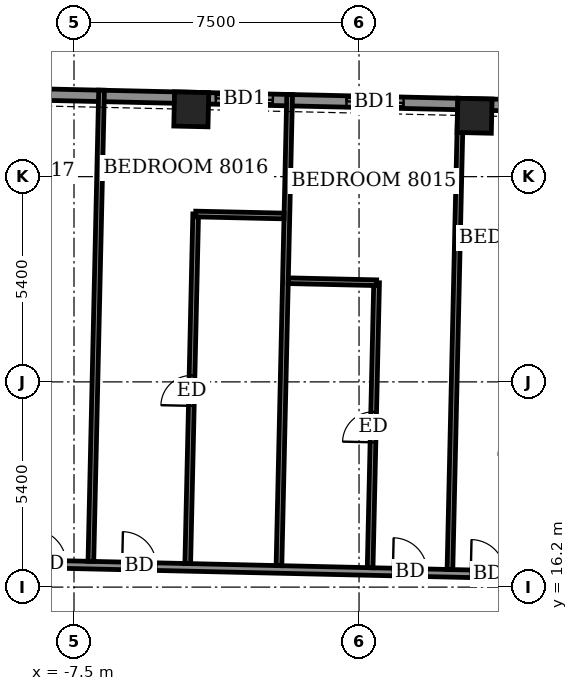
"""IFC4 building model, lengths in metres.
Left out: names, types, materials, properties, quantities, classifications, styles, units other than length and angle.
Written with IfcOpenShell. Run it as: python <this file> out.ifc"""

import sys

from ifc_helpers import new_model, si_unit, direction, frame, frame_2d, origin, origin_2d, place, context, subcontext, project, spatial, rectangle, extrude, element, fill, save


model = new_model("IFC4")
c1 = context("Model", 3, precision=1e-05, world=origin(), true_north=direction((0.0, 1.0)))
c2 = subcontext(c1, "Body", "Model", "MODEL_VIEW")
j1 = project(units=[si_unit("LENGTHUNIT", "METRE"), si_unit("PLANEANGLEUNIT", "RADIAN")], contexts=[c1])
p1 = place(None, origin())
s1 = spatial("IfcSite", under=j1, at=p1, CompositionType="ELEMENT")
p2 = place(p1, origin())
s2 = spatial("IfcBuilding", under=s1, at=p2, CompositionType="ELEMENT")
p3 = place(p2, frame((0.0, 0.0, 313.3)))
s3 = spatial("IfcBuildingStorey", under=s2, at=p3, CompositionType="ELEMENT", Elevation=313.3)
for number, where, z_axis, x_axis in (
    (1, (3.041, 28.602, -0.55), (0.0, 0.0, 1.0), (-1.0, 0.023, 0.0)),
    (2, (-4.414, 28.771, -0.55), (0.0, 0.0, 1.0), (-1.0, 0.023, 0.0)),
):
    element("IfcColumn", number, at=place(p3, frame(where, z_axis=z_axis, x_axis=x_axis)), inside=s3, PredefinedType="COLUMN", context=c2, shape_type="SweptSolid", body=[
        extrude(rectangle(XDim=0.9, YDim=0.9, at=origin_2d()), origin(), (0.0, 0.0, 1.0), 3.6),
    ])
p4 = place(p3, frame((25.264, 28.397, 0.0), z_axis=(0.0, 0.0, 1.0), x_axis=(-0.999742391375, 0.022696935658, 0.0)))
e3 = element("IfcWall", 3, at=p4, inside=s3, PredefinedType="SOLIDWALL", context=c2, shape_type="SweptSolid", body=[
    extrude(rectangle(XDim=51.9, YDim=0.3, at=frame_2d((25.95, 0.0))), origin(), (0.0, 0.0, 1.0), 2.5),
])
p5 = place(p4, frame((1.898, 0.0, 0.0)))
e4 = element("IfcOpeningElement", 4, at=p5, cuts=e3, PredefinedType="OPENING", context=c2, shape_type="SweptSolid", body=[
    extrude(rectangle(XDim=1.5, YDim=2.4, at=frame_2d((0.75, 1.2))), frame((0.0, 0.16, 0.0), z_axis=(0.0, -1.0, 0.0), x_axis=(1.0, 0.0, 0.0)), (0.0, 0.0, 1.0), 0.32),
])
p6 = place(p4, frame((5.229, 0.0, 0.0)))
e5 = element("IfcOpeningElement", 5, at=p6, cuts=e3, PredefinedType="OPENING", context=c2, shape_type="SweptSolid", body=[
    extrude(rectangle(XDim=1.5, YDim=2.4, at=frame_2d((0.75, 1.2))), frame((0.0, 0.16, 0.0), z_axis=(0.0, -1.0, 0.0), x_axis=(1.0, 0.0, 0.0)), (0.0, 0.0, 1.0), 0.32),
])
p7 = place(p4, frame((10.7, 0.0, 0.0)))
e6 = element("IfcOpeningElement", 6, at=p7, cuts=e3, PredefinedType="OPENING", context=c2, shape_type="SweptSolid", body=[
    extrude(rectangle(XDim=1.5, YDim=2.4, at=frame_2d((0.75, 1.2))), frame((0.0, 0.16, 0.0), z_axis=(0.0, -1.0, 0.0), x_axis=(1.0, 0.0, 0.0)), (0.0, 0.0, 1.0), 0.32),
])
p8 = place(p4, frame((15.832, 0.0, 0.0)))
e7 = element("IfcOpeningElement", 7, at=p8, cuts=e3, PredefinedType="OPENING", context=c2, shape_type="SweptSolid", body=[
    extrude(rectangle(XDim=1.5, YDim=2.4, at=frame_2d((0.75, 1.2))), frame((0.0, 0.16, 0.0), z_axis=(0.0, -1.0, 0.0), x_axis=(1.0, 0.0, 0.0)), (0.0, 0.0, 1.0), 0.32),
])
p9 = place(p4, frame((19.361, 0.0, 0.0)))
e8 = element("IfcOpeningElement", 8, at=p9, cuts=e3, PredefinedType="OPENING", context=c2, shape_type="SweptSolid", body=[
    extrude(rectangle(XDim=1.5, YDim=2.4, at=frame_2d((0.75, 1.2))), frame((0.0, 0.16, 0.0), z_axis=(0.0, -1.0, 0.0), x_axis=(1.0, 0.0, 0.0)), (0.0, 0.0, 1.0), 0.32),
])
p10 = place(p4, frame((24.1, 0.0, 0.0)))
e9 = element("IfcOpeningElement", 9, at=p10, cuts=e3, PredefinedType="OPENING", context=c2, shape_type="SweptSolid", body=[
    extrude(rectangle(XDim=1.5, YDim=2.4, at=frame_2d((0.75, 1.2))), frame((0.0, 0.16, 0.0), z_axis=(0.0, -1.0, 0.0), x_axis=(1.0, 0.0, 0.0)), (0.0, 0.0, 1.0), 0.32),
])
p11 = place(p4, frame((27.539, 0.0, 0.0)))
e10 = element("IfcOpeningElement", 10, at=p11, cuts=e3, PredefinedType="OPENING", context=c2, shape_type="SweptSolid", body=[
    extrude(rectangle(XDim=1.5, YDim=2.4, at=frame_2d((0.75, 1.2))), frame((0.0, 0.16, 0.0), z_axis=(0.0, -1.0, 0.0), x_axis=(1.0, 0.0, 0.0)), (0.0, 0.0, 1.0), 0.32),
])
p12 = place(p4, frame((33.6, 0.0, 0.0)))
e11 = element("IfcOpeningElement", 11, at=p12, cuts=e3, PredefinedType="OPENING", context=c2, shape_type="SweptSolid", body=[
    extrude(rectangle(XDim=1.5, YDim=2.4, at=frame_2d((0.75, 1.2))), frame((0.0, 0.16, 0.0), z_axis=(0.0, -1.0, 0.0), x_axis=(1.0, 0.0, 0.0)), (0.0, 0.0, 1.0), 0.32),
])
p13 = place(p4, frame((38.643, 0.0, 0.0)))
e12 = element("IfcOpeningElement", 12, at=p13, cuts=e3, PredefinedType="OPENING", context=c2, shape_type="SweptSolid", body=[
    extrude(rectangle(XDim=1.5, YDim=2.4, at=frame_2d((0.75, 1.2))), frame((0.0, 0.16, 0.0), z_axis=(0.0, -1.0, 0.0), x_axis=(1.0, 0.0, 0.0)), (0.0, 0.0, 1.0), 0.32),
])
p14 = place(p4, frame((42.171, 0.0, 0.0)))
e13 = element("IfcOpeningElement", 13, at=p14, cuts=e3, PredefinedType="OPENING", context=c2, shape_type="SweptSolid", body=[
    extrude(rectangle(XDim=1.5, YDim=2.4, at=frame_2d((0.75, 1.2))), frame((0.0, 0.16, 0.0), z_axis=(0.0, -1.0, 0.0), x_axis=(1.0, 0.0, 0.0)), (0.0, 0.0, 1.0), 0.32),
])
p15 = place(p4, frame((47.637, 0.0, 0.9)))
e14 = element("IfcOpeningElement", 14, at=p15, cuts=e3, PredefinedType="OPENING", context=c2, shape_type="SweptSolid", body=[
    extrude(rectangle(XDim=2.4, YDim=1.5, at=frame_2d((1.2, 0.75))), frame((0.0, 0.16, 0.0), z_axis=(0.0, -1.0, 0.0), x_axis=(1.0, 0.0, 0.0)), (0.0, 0.0, 1.0), 0.32),
])
p16 = place(p3, frame((-30.652, 17.313, 0.0), z_axis=(0.0, 0.0, 1.0), x_axis=(0.999742623764, -0.02268669719, 0.0)))
e15 = element("IfcWall", 15, at=p16, inside=s3, PredefinedType="PARTITIONING", context=c2, shape_type="SweptSolid", body=[
    extrude(rectangle(XDim=58.8, YDim=0.2, at=frame_2d((29.4, 0.0))), origin(), (0.0, 0.0, 1.0), 3.05),
])
p17 = place(p16, frame((54.601, 0.0, 0.0)))
e16 = element("IfcOpeningElement", 16, at=p17, cuts=e15, PredefinedType="OPENING", context=c2, shape_type="SweptSolid", body=[
    extrude(rectangle(XDim=1.0, YDim=2.1, at=frame_2d((0.5, 1.05))), frame((0.0, 0.11, 0.0), z_axis=(0.0, -1.0, 0.0), x_axis=(1.0, 0.0, 0.0)), (0.0, 0.0, 1.0), 0.22),
])
p18 = place(p16, frame((49.35, 0.0, 0.0)))
e17 = element("IfcOpeningElement", 17, at=p18, cuts=e15, PredefinedType="OPENING", context=c2, shape_type="SweptSolid", body=[
    extrude(rectangle(XDim=0.9, YDim=2.1, at=frame_2d((0.45, 1.05))), frame((0.0, 0.11, 0.0), z_axis=(0.0, -1.0, 0.0), x_axis=(1.0, 0.0, 0.0)), (0.0, 0.0, 1.0), 0.22),
])
p19 = place(p16, frame((42.55, 0.0, 0.0)))
e18 = element("IfcOpeningElement", 18, at=p19, cuts=e15, PredefinedType="OPENING", context=c2, shape_type="SweptSolid", body=[
    extrude(rectangle(XDim=0.9, YDim=2.1, at=frame_2d((0.45, 1.05))), frame((0.0, 0.11, 0.0), z_axis=(0.0, -1.0, 0.0), x_axis=(1.0, 0.0, 0.0)), (0.0, 0.0, 1.0), 0.22),
])
p20 = place(p16, frame((40.475, 0.0, 0.0)))
e19 = element("IfcOpeningElement", 19, at=p20, cuts=e15, PredefinedType="OPENING", context=c2, shape_type="SweptSolid", body=[
    extrude(rectangle(XDim=0.9, YDim=2.1, at=frame_2d((0.45, 1.05))), frame((0.0, 0.11, 0.0), z_axis=(0.0, -1.0, 0.0), x_axis=(1.0, 0.0, 0.0)), (0.0, 0.0, 1.0), 0.22),
])
p21 = place(p16, frame((33.6, 0.0, 0.0)))
e20 = element("IfcOpeningElement", 20, at=p21, cuts=e15, PredefinedType="OPENING", context=c2, shape_type="SweptSolid", body=[
    extrude(rectangle(XDim=0.9, YDim=2.1, at=frame_2d((0.45, 1.05))), frame((0.0, 0.11, 0.0), z_axis=(0.0, -1.0, 0.0), x_axis=(1.0, 0.0, 0.0)), (0.0, 0.0, 1.0), 0.22),
])
p22 = place(p16, frame((31.55, 0.0, 0.0)))
e21 = element("IfcOpeningElement", 21, at=p22, cuts=e15, PredefinedType="OPENING", context=c2, shape_type="SweptSolid", body=[
    extrude(rectangle(XDim=0.9, YDim=2.1, at=frame_2d((0.45, 1.05))), frame((0.0, 0.11, 0.0), z_axis=(0.0, -1.0, 0.0), x_axis=(1.0, 0.0, 0.0)), (0.0, 0.0, 1.0), 0.22),
])
p23 = place(p16, frame((24.425, 0.0, 0.0)))
e22 = element("IfcOpeningElement", 22, at=p23, cuts=e15, PredefinedType="OPENING", context=c2, shape_type="SweptSolid", body=[
    extrude(rectangle(XDim=0.9, YDim=2.1, at=frame_2d((0.45, 1.05))), frame((0.0, 0.11, 0.0), z_axis=(0.0, -1.0, 0.0), x_axis=(1.0, 0.0, 0.0)), (0.0, 0.0, 1.0), 0.22),
])
p24 = place(p16, frame((22.05, 0.0, 0.0)))
e23 = element("IfcOpeningElement", 23, at=p24, cuts=e15, PredefinedType="OPENING", context=c2, shape_type="SweptSolid", body=[
    extrude(rectangle(XDim=0.9, YDim=2.1, at=frame_2d((0.45, 1.05))), frame((0.0, 0.11, 0.0), z_axis=(0.0, -1.0, 0.0), x_axis=(1.0, 0.0, 0.0)), (0.0, 0.0, 1.0), 0.22),
])
p25 = place(p16, frame((14.95, 0.0, 0.0)))
e24 = element("IfcOpeningElement", 24, at=p25, cuts=e15, PredefinedType="OPENING", context=c2, shape_type="SweptSolid", body=[
    extrude(rectangle(XDim=0.9, YDim=2.1, at=frame_2d((0.45, 1.05))), frame((0.0, 0.11, 0.0), z_axis=(0.0, -1.0, 0.0), x_axis=(1.0, 0.0, 0.0)), (0.0, 0.0, 1.0), 0.22),
])
p26 = place(p16, frame((12.525, 0.0, 0.0)))
e25 = element("IfcOpeningElement", 25, at=p26, cuts=e15, PredefinedType="OPENING", context=c2, shape_type="SweptSolid", body=[
    extrude(rectangle(XDim=0.9, YDim=2.1, at=frame_2d((0.45, 1.05))), frame((0.0, 0.11, 0.0), z_axis=(0.0, -1.0, 0.0), x_axis=(1.0, 0.0, 0.0)), (0.0, 0.0, 1.0), 0.22),
])
p27 = place(p16, frame((4.032, 0.0, 0.0)))
e26 = element("IfcOpeningElement", 26, at=p27, cuts=e15, PredefinedType="OPENING", context=c2, shape_type="SweptSolid", body=[
    extrude(rectangle(XDim=1.0, YDim=2.1, at=frame_2d((0.5, 1.05))), frame((0.0, 0.11, 0.0), z_axis=(0.0, -1.0, 0.0), x_axis=(1.0, 0.0, 0.0)), (0.0, 0.0, 1.0), 0.22),
])
p28 = place(p3, frame((-7.056, 16.878, 0.0), z_axis=(0.0, 0.0, 1.0), x_axis=(0.022661475803, 0.999743195783, 0.0)))
e27 = element("IfcWall", 27, at=p28, inside=s3, PredefinedType="PARTITIONING", context=c2, shape_type="SweptSolid", body=[
    extrude(rectangle(XDim=12.4, YDim=0.15, at=frame_2d((6.2, 0.0))), origin(), (0.0, 0.0, 1.0), 2.5),
])
p29 = place(p3, frame((-4.507, 16.82, 0.0), z_axis=(0.0, 0.0, 1.0), x_axis=(0.022717185456, 0.999741931443, 0.0)))
e28 = element("IfcWall", 28, at=p29, inside=s3, PredefinedType="PARTITIONING", context=c2, shape_type="SweptSolid", body=[
    extrude(rectangle(XDim=9.199, YDim=0.15, at=frame_2d((4.6, 0.0))), origin(), (0.0, 0.0, 1.0), 3.05),
])
p30 = place(p29, frame((4.15, 0.0, 0.0)))
e29 = element("IfcOpeningElement", 29, at=p30, cuts=e28, PredefinedType="OPENING", context=c2, shape_type="SweptSolid", body=[
    extrude(rectangle(XDim=0.8, YDim=2.1, at=frame_2d((0.4, 1.05))), frame((0.0, 0.085, 0.0), z_axis=(0.0, -1.0, 0.0), x_axis=(1.0, 0.0, 0.0)), (0.0, 0.0, 1.0), 0.17),
])
p31 = place(p3, frame((-2.107, 16.765, 0.0), z_axis=(0.0, 0.0, 1.0), x_axis=(0.022661029756, 0.999743205894, 0.0)))
e30 = element("IfcWall", 30, at=p31, inside=s3, PredefinedType="PARTITIONING", context=c2, shape_type="SweptSolid", body=[
    extrude(rectangle(XDim=12.4, YDim=0.15, at=frame_2d((6.2, 0.0))), origin(), (0.0, 0.0, 1.0), 2.5),
])
p32 = place(p3, frame((0.292, 16.711, 0.0), z_axis=(0.0, 0.0, 1.0), x_axis=(0.022656334507, 0.999743312309, 0.0)))
e31 = element("IfcWall", 31, at=p32, inside=s3, PredefinedType="PARTITIONING", context=c2, shape_type="SweptSolid", body=[
    extrude(rectangle(XDim=7.5, YDim=0.15, at=frame_2d((3.75, 0.0))), origin(), (0.0, 0.0, 1.0), 3.05),
])
p33 = place(p32, frame((3.3, 0.0, 0.0)))
e32 = element("IfcOpeningElement", 32, at=p33, cuts=e31, PredefinedType="OPENING", context=c2, shape_type="SweptSolid", body=[
    extrude(rectangle(XDim=0.8, YDim=2.1, at=frame_2d((0.4, 1.05))), frame((0.0, 0.085, 0.0), z_axis=(0.0, -1.0, 0.0), x_axis=(1.0, 0.0, 0.0)), (0.0, 0.0, 1.0), 0.17),
])
p34 = place(p3, frame((2.392, 16.663, 0.0), z_axis=(0.0, 0.0, 1.0), x_axis=(0.022661475803, 0.999743195783, 0.0)))
e33 = element("IfcWall", 33, at=p34, inside=s3, PredefinedType="PARTITIONING", context=c2, shape_type="SweptSolid", body=[
    extrude(rectangle(XDim=12.4, YDim=0.15, at=frame_2d((6.2, 0.0))), origin(), (0.0, 0.0, 1.0), 2.5),
])
p35 = place(p3, frame((-1.862, 24.262, 0.0), z_axis=(0.0, 0.0, 1.0), x_axis=(0.999740260747, -0.02279059109, 0.0)))
e34 = element("IfcWall", 34, at=p35, inside=s3, PredefinedType="PARTITIONING", context=c2, shape_type="SweptSolid", body=[
    extrude(rectangle(XDim=2.324, YDim=0.15, at=frame_2d((1.162, 0.0))), origin(), (0.0, 0.0, 1.0), 3.05),
])
p36 = place(p3, frame((-4.298, 26.017, 0.0), z_axis=(0.0, 0.0, 1.0), x_axis=(0.999750007167, -0.022358961731, 0.0)))
e35 = element("IfcWall", 35, at=p36, inside=s3, PredefinedType="PARTITIONING", context=c2, shape_type="SweptSolid", body=[
    extrude(rectangle(XDim=2.326, YDim=0.15, at=frame_2d((1.163, 0.0))), origin(), (0.0, 0.0, 1.0), 3.05),
])
p37 = place(p10, origin())
e36 = element("IfcDoor", 36, at=p37, inside=s3, OperationType="SLIDING_TO_LEFT", PredefinedType="DOOR", context=c2, shape_type="SweptSolid", body=[
    extrude(rectangle(XDim=1.5, YDim=2.4, at=frame_2d((0.75, 1.2))), frame((0.0, 0.025, 0.0), z_axis=(0.0, -1.0, 0.0), x_axis=(1.0, 0.0, 0.0)), (0.0, 0.0, 1.0), 0.05),
])
fill(e9, e36)
p38 = place(p11, origin())
e37 = element("IfcDoor", 37, at=p38, inside=s3, OperationType="SLIDING_TO_LEFT", PredefinedType="DOOR", context=c2, shape_type="SweptSolid", body=[
    extrude(rectangle(XDim=1.5, YDim=2.4, at=frame_2d((0.75, 1.2))), frame((0.0, 0.025, 0.0), z_axis=(0.0, -1.0, 0.0), x_axis=(1.0, 0.0, 0.0)), (0.0, 0.0, 1.0), 0.05),
])
fill(e10, e37)
p39 = place(p21, origin())
e38 = element("IfcDoor", 38, at=p39, inside=s3, OperationType="SINGLE_SWING_RIGHT", PredefinedType="DOOR", context=c2, shape_type="SweptSolid", body=[
    extrude(rectangle(XDim=0.9, YDim=2.1, at=frame_2d((0.45, 1.05))), frame((0.0, 0.025, 0.0), z_axis=(0.0, -1.0, 0.0), x_axis=(1.0, 0.0, 0.0)), (0.0, 0.0, 1.0), 0.05),
])
fill(e20, e38)
p40 = place(p22, origin())
e39 = element("IfcDoor", 39, at=p40, inside=s3, OperationType="SINGLE_SWING_LEFT", PredefinedType="DOOR", context=c2, shape_type="SweptSolid", body=[
    extrude(rectangle(XDim=0.9, YDim=2.1, at=frame_2d((0.45, 1.05))), frame((0.0, 0.025, 0.0), z_axis=(0.0, -1.0, 0.0), x_axis=(1.0, 0.0, 0.0)), (0.0, 0.0, 1.0), 0.05),
])
fill(e21, e39)
p41 = place(p33, origin())
e40 = element("IfcDoor", 40, at=p41, inside=s3, OperationType="SINGLE_SWING_LEFT", PredefinedType="DOOR", context=c2, shape_type="SweptSolid", body=[
    extrude(rectangle(XDim=0.8, YDim=2.1, at=frame_2d((0.4, 1.05))), frame((0.0, 0.025, 0.0), z_axis=(0.0, -1.0, 0.0), x_axis=(1.0, 0.0, 0.0)), (0.0, 0.0, 1.0), 0.05),
])
fill(e32, e40)
p42 = place(p23, origin())
e41 = element("IfcDoor", 41, at=p42, inside=s3, OperationType="SINGLE_SWING_RIGHT", PredefinedType="DOOR", context=c2, shape_type="SweptSolid", body=[
    extrude(rectangle(XDim=0.9, YDim=2.1, at=frame_2d((0.45, 1.05))), frame((0.0, 0.025, 0.0), z_axis=(0.0, -1.0, 0.0), x_axis=(1.0, 0.0, 0.0)), (0.0, 0.0, 1.0), 0.05),
])
fill(e22, e41)
p43 = place(p30, origin())
e42 = element("IfcDoor", 42, at=p43, inside=s3, OperationType="SINGLE_SWING_RIGHT", PredefinedType="DOOR", context=c2, shape_type="SweptSolid", body=[
    extrude(rectangle(XDim=0.8, YDim=2.1, at=frame_2d((0.4, 1.05))), frame((0.0, 0.025, 0.0), z_axis=(0.0, -1.0, 0.0), x_axis=(1.0, 0.0, 0.0)), (0.0, 0.0, 1.0), 0.05),
])
fill(e29, e42)
p44 = place(p24, origin())
e43 = element("IfcDoor", 43, at=p44, inside=s3, OperationType="SINGLE_SWING_LEFT", PredefinedType="DOOR", context=c2, shape_type="SweptSolid", body=[
    extrude(rectangle(XDim=0.9, YDim=2.1, at=frame_2d((0.45, 1.05))), frame((0.0, 0.025, 0.0), z_axis=(0.0, -1.0, 0.0), x_axis=(1.0, 0.0, 0.0)), (0.0, 0.0, 1.0), 0.05),
])
fill(e23, e43)
save(model, sys.argv[1])
